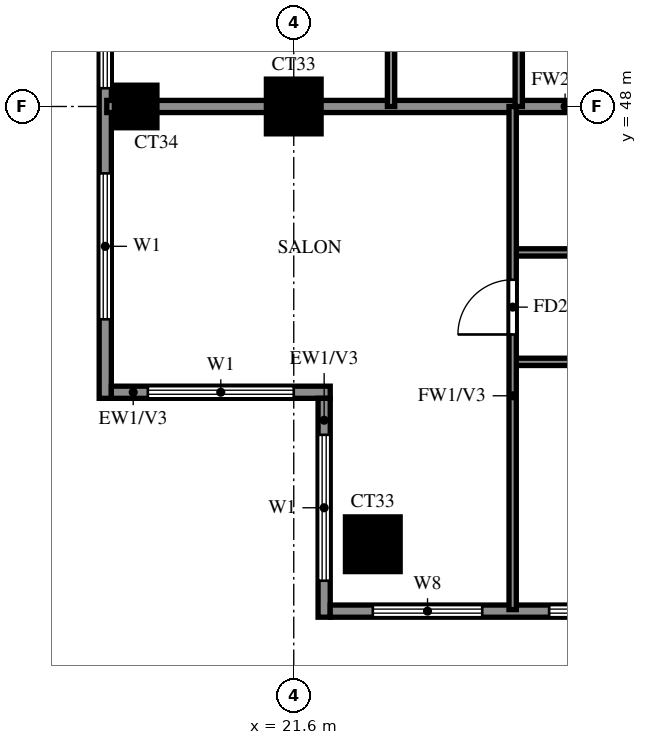
"""IFC4 building model, lengths in metres.
Left out: names, types, materials, properties, quantities, classifications, styles, units other than length and angle.
Written with IfcOpenShell. Run it as: python <this file> out.ifc"""

import sys

from ifc_helpers import new_model, si_unit, direction, frame, frame_2d, origin, origin_2d, place, context, subcontext, project, spatial, rectangle, extrude, source, transform, mapped, element, fill, save


model = new_model("IFC4")
c1 = context("Model", 3, precision=1e-05, world=origin(), true_north=direction((0.0, 1.0)))
c2 = subcontext(c1, "Body", "Model", "MODEL_VIEW")
j1 = project(units=[si_unit("LENGTHUNIT", "METRE"), si_unit("PLANEANGLEUNIT", "RADIAN")], contexts=[c1])
p1 = place(None, origin())
s1 = spatial("IfcSite", under=j1, at=p1, CompositionType="ELEMENT")
p2 = place(p1, origin())
s2 = spatial("IfcBuilding", under=s1, at=p2, CompositionType="ELEMENT")
p3 = place(p2, frame((0.0, 0.0, 222.0)))
s3 = spatial("IfcBuildingStorey", under=s2, at=p3, CompositionType="ELEMENT", Elevation=222.0)
m1 = source(origin(), c2, "Body", "SweptSolid", [
    extrude(rectangle(XDim=0.9, YDim=0.9, at=origin_2d()), origin(), (0.0, 0.0, 1.0), 3.22),
])
p4 = place(p3, frame((22.9, 40.8, 0.0), z_axis=(0.0, 0.0, 1.0), x_axis=(1.0, 0.0, 0.0)))
e1 = element("IfcColumn", 1, at=p4, inside=s3, PredefinedType="COLUMN", context=c2, shape_type="MappedRepresentation", body=[
    mapped(m1, transform((0.0, 0.0, 0.0))),
])
m2 = source(origin(), c2, "Body", "SweptSolid", [
    extrude(rectangle(XDim=0.7, YDim=0.7, at=origin_2d()), origin(), (0.0, 0.0, 1.0), 3.22),
])
p5 = place(p3, frame((19.0, 48.0, 0.0), z_axis=(0.0, 0.0, 1.0), x_axis=(1.0, 0.0, 0.0)))
e2 = element("IfcColumn", 2, at=p5, inside=s3, PredefinedType="COLUMN", context=c2, shape_type="MappedRepresentation", body=[
    mapped(m2, transform((0.0, 0.0, 0.0))),
])
p6 = place(p3, frame((21.6, 48.0, 0.0), z_axis=(0.0, 0.0, 1.0), x_axis=(1.0, 0.0, 0.0)))
e3 = element("IfcColumn", 3, at=p6, inside=s3, PredefinedType="COLUMN", context=c2, shape_type="MappedRepresentation", body=[
    mapped(m1, transform((0.0, 0.0, 0.0))),
])
p7 = place(p3, frame((18.5, 76.6, 0.0), z_axis=(0.0, 0.0, 1.0), x_axis=(0.0, -1.0, 0.0)))
e4 = element("IfcWall", 4, at=p7, inside=s3, PredefinedType="SOLIDWALL", context=c2, shape_type="SweptSolid", body=[
    extrude(rectangle(XDim=33.4, YDim=0.2, at=frame_2d((16.7, 0.0))), origin(), (0.0, 0.0, 1.0), 3.22),
])
p8 = place(p7, frame((7.9, 0.0, 0.0)))
e5 = element("IfcOpeningElement", 5, at=p8, cuts=e4, PredefinedType="OPENING", context=c2, shape_type="SweptSolid", body=[
    extrude(rectangle(XDim=1.8, YDim=2.4, at=frame_2d((0.9, 1.2))), frame((0.0, 0.11, 0.0), z_axis=(0.0, -1.0, 0.0), x_axis=(1.0, 0.0, 0.0)), (0.0, 0.0, 1.0), 0.22),
])
p9 = place(p7, frame((22.3, 0.0, 0.0)))
e6 = element("IfcOpeningElement", 6, at=p9, cuts=e4, PredefinedType="OPENING", context=c2, shape_type="SweptSolid", body=[
    extrude(rectangle(XDim=1.8, YDim=2.4, at=frame_2d((0.9, 1.2))), frame((0.0, 0.11, 0.0), z_axis=(0.0, -1.0, 0.0), x_axis=(1.0, 0.0, 0.0)), (0.0, 0.0, 1.0), 0.22),
])
p10 = place(p7, frame((29.7, 0.0, 0.6)))
e7 = element("IfcOpeningElement", 7, at=p10, cuts=e4, PredefinedType="OPENING", context=c2, shape_type="SweptSolid", body=[
    extrude(rectangle(XDim=2.4, YDim=2.4, at=frame_2d((1.2, 1.2))), frame((0.0, 0.11, 0.0), z_axis=(0.0, -1.0, 0.0), x_axis=(1.0, 0.0, 0.0)), (0.0, 0.0, 1.0), 0.22),
])
p11 = place(p7, frame((26.5, 0.0, 0.6)))
e8 = element("IfcOpeningElement", 8, at=p11, cuts=e4, PredefinedType="OPENING", context=c2, shape_type="SweptSolid", body=[
    extrude(rectangle(XDim=1.8, YDim=2.4, at=frame_2d((0.9, 1.2))), frame((0.0, 0.11, 0.0), z_axis=(0.0, -1.0, 0.0), x_axis=(1.0, 0.0, 0.0)), (0.0, 0.0, 1.0), 0.22),
])
p12 = place(p7, frame((15.4, 0.0, 0.6)))
e9 = element("IfcOpeningElement", 9, at=p12, cuts=e4, PredefinedType="OPENING", context=c2, shape_type="SweptSolid", body=[
    extrude(rectangle(XDim=2.4, YDim=2.4, at=frame_2d((1.2, 1.2))), frame((0.0, 0.11, 0.0), z_axis=(0.0, -1.0, 0.0), x_axis=(1.0, 0.0, 0.0)), (0.0, 0.0, 1.0), 0.22),
])
p13 = place(p7, frame((19.9, 0.0, 0.6)))
e10 = element("IfcOpeningElement", 10, at=p13, cuts=e4, PredefinedType="OPENING", context=c2, shape_type="SweptSolid", body=[
    extrude(rectangle(XDim=1.2, YDim=2.4, at=frame_2d((0.6, 1.2))), frame((0.0, 0.11, 0.0), z_axis=(0.0, -1.0, 0.0), x_axis=(1.0, 0.0, 0.0)), (0.0, 0.0, 1.0), 0.22),
])
p14 = place(p7, frame((12.1, 0.0, 0.6)))
e11 = element("IfcOpeningElement", 11, at=p14, cuts=e4, PredefinedType="OPENING", context=c2, shape_type="SweptSolid", body=[
    extrude(rectangle(XDim=1.8, YDim=2.4, at=frame_2d((0.9, 1.2))), frame((0.0, 0.11, 0.0), z_axis=(0.0, -1.0, 0.0), x_axis=(1.0, 0.0, 0.0)), (0.0, 0.0, 1.0), 0.22),
])
p15 = place(p7, frame((3.55, 0.0, 0.6)))
e12 = element("IfcOpeningElement", 12, at=p15, cuts=e4, PredefinedType="OPENING", context=c2, shape_type="SweptSolid", body=[
    extrude(rectangle(XDim=0.9, YDim=2.4, at=frame_2d((0.45, 1.2))), frame((0.0, 0.11, 0.0), z_axis=(0.0, -1.0, 0.0), x_axis=(1.0, 0.0, 0.0)), (0.0, 0.0, 1.0), 0.22),
])
p16 = place(p7, frame((5.5, 0.0, 0.6)))
e13 = element("IfcOpeningElement", 13, at=p16, cuts=e4, PredefinedType="OPENING", context=c2, shape_type="SweptSolid", body=[
    extrude(rectangle(XDim=1.2, YDim=2.4, at=frame_2d((0.6, 1.2))), frame((0.0, 0.11, 0.0), z_axis=(0.0, -1.0, 0.0), x_axis=(1.0, 0.0, 0.0)), (0.0, 0.0, 1.0), 0.22),
])
p17 = place(p7, frame((0.6, 0.0, 0.6)))
e14 = element("IfcOpeningElement", 14, at=p17, cuts=e4, PredefinedType="OPENING", context=c2, shape_type="SweptSolid", body=[
    extrude(rectangle(XDim=2.4, YDim=2.4, at=frame_2d((1.2, 1.2))), frame((0.0, 0.11, 0.0), z_axis=(0.0, -1.0, 0.0), x_axis=(1.0, 0.0, 0.0)), (0.0, 0.0, 1.0), 0.22),
])
p18 = place(p3, frame((18.6, 43.3, 0.0), z_axis=(0.0, 0.0, 1.0), x_axis=(1.0, 0.0, 0.0)))
e15 = element("IfcWall", 15, at=p18, inside=s3, PredefinedType="SOLIDWALL", context=c2, shape_type="SweptSolid", body=[
    extrude(rectangle(XDim=3.6, YDim=0.2, at=frame_2d((1.8, 0.0))), origin(), (0.0, 0.0, 1.0), 3.22),
])
p19 = place(p18, frame((0.6, 0.0, 0.6)))
e16 = element("IfcOpeningElement", 16, at=p19, cuts=e15, PredefinedType="OPENING", context=c2, shape_type="SweptSolid", body=[
    extrude(rectangle(XDim=2.4, YDim=2.4, at=frame_2d((1.2, 1.2))), frame((0.0, 0.11, 0.0), z_axis=(0.0, -1.0, 0.0), x_axis=(1.0, 0.0, 0.0)), (0.0, 0.0, 1.0), 0.22),
])
p20 = place(p3, frame((22.1, 43.2, 0.0), z_axis=(0.0, 0.0, 1.0), x_axis=(0.0, -1.0, 0.0)))
e17 = element("IfcWall", 17, at=p20, inside=s3, PredefinedType="SOLIDWALL", context=c2, shape_type="SweptSolid", body=[
    extrude(rectangle(XDim=3.6, YDim=0.2, at=frame_2d((1.8, 0.0))), origin(), (0.0, 0.0, 1.0), 3.22),
])
p21 = place(p20, frame((0.6, 0.0, 0.6)))
e18 = element("IfcOpeningElement", 18, at=p21, cuts=e17, PredefinedType="OPENING", context=c2, shape_type="SweptSolid", body=[
    extrude(rectangle(XDim=2.4, YDim=2.4, at=frame_2d((1.2, 1.2))), frame((0.0, 0.11, 0.0), z_axis=(0.0, -1.0, 0.0), x_axis=(1.0, 0.0, 0.0)), (0.0, 0.0, 1.0), 0.22),
])
p22 = place(p3, frame((22.2, 39.7, 0.0), z_axis=(0.0, 0.0, 1.0), x_axis=(1.0, 0.0, 0.0)))
e19 = element("IfcWall", 19, at=p22, inside=s3, PredefinedType="SOLIDWALL", context=c2, shape_type="SweptSolid", body=[
    extrude(rectangle(XDim=19.8, YDim=0.2, at=frame_2d((9.9, 0.0))), origin(), (0.0, 0.0, 1.0), 3.22),
])
p23 = place(p22, frame((9.3, 0.0, 0.0)))
e20 = element("IfcOpeningElement", 20, at=p23, cuts=e19, PredefinedType="OPENING", context=c2, shape_type="SweptSolid", body=[
    extrude(rectangle(XDim=1.8, YDim=2.4, at=frame_2d((0.9, 1.2))), frame((0.0, 0.11, 0.0), z_axis=(0.0, -1.0, 0.0), x_axis=(1.0, 0.0, 0.0)), (0.0, 0.0, 1.0), 0.22),
])
p24 = place(p22, frame((0.7, 0.0, 0.6)))
e21 = element("IfcOpeningElement", 21, at=p24, cuts=e19, PredefinedType="OPENING", context=c2, shape_type="SweptSolid", body=[
    extrude(rectangle(XDim=1.8, YDim=2.4, at=frame_2d((0.9, 1.2))), frame((0.0, 0.11, 0.0), z_axis=(0.0, -1.0, 0.0), x_axis=(1.0, 0.0, 0.0)), (0.0, 0.0, 1.0), 0.22),
])
p25 = place(p22, frame((3.6, 0.0, 0.6)))
e22 = element("IfcOpeningElement", 22, at=p25, cuts=e19, PredefinedType="OPENING", context=c2, shape_type="SweptSolid", body=[
    extrude(rectangle(XDim=2.4, YDim=2.4, at=frame_2d((1.2, 1.2))), frame((0.0, 0.11, 0.0), z_axis=(0.0, -1.0, 0.0), x_axis=(1.0, 0.0, 0.0)), (0.0, 0.0, 1.0), 0.22),
])
p26 = place(p22, frame((7.5, 0.0, 0.6)))
e23 = element("IfcOpeningElement", 23, at=p26, cuts=e19, PredefinedType="OPENING", context=c2, shape_type="SweptSolid", body=[
    extrude(rectangle(XDim=1.2, YDim=2.4, at=frame_2d((0.6, 1.2))), frame((0.0, 0.11, 0.0), z_axis=(0.0, -1.0, 0.0), x_axis=(1.0, 0.0, 0.0)), (0.0, 0.0, 1.0), 0.22),
])
p27 = place(p3, frame((18.525, 48.0, 0.0), z_axis=(0.0, 0.0, 1.0), x_axis=(1.0, 0.0, 0.0)))
e24 = element("IfcWall", 24, at=p27, inside=s3, PredefinedType="SOLIDWALL", context=c2, shape_type="SweptSolid", body=[
    extrude(rectangle(XDim=15.075, YDim=0.2, at=frame_2d((7.538, 0.0))), origin(), (0.0, 0.0, 1.0), 3.22),
])
p28 = place(p3, frame((25.2, 43.8, 0.0), z_axis=(0.0, 0.0, 1.0), x_axis=(1.0, 0.0, 0.0)))
e25 = element("IfcWall", 25, at=p28, inside=s3, PredefinedType="PARTITIONING", context=c2, shape_type="SweptSolid", body=[
    extrude(rectangle(XDim=8.4, YDim=0.12, at=frame_2d((4.2, 0.0))), origin(), (0.0, 0.0, 1.0), 3.22),
])
p29 = place(p28, frame((1.35, 0.0, 0.0)))
e26 = element("IfcOpeningElement", 26, at=p29, cuts=e25, PredefinedType="OPENING", context=c2, shape_type="SweptSolid", body=[
    extrude(rectangle(XDim=0.9, YDim=2.1, at=frame_2d((0.45, 1.05))), frame((0.0, 0.07, 0.0), z_axis=(0.0, -1.0, 0.0), x_axis=(1.0, 0.0, 0.0)), (0.0, 0.0, 1.0), 0.14),
])
p30 = place(p28, frame((5.55, 0.0, 0.0)))
e27 = element("IfcOpeningElement", 27, at=p30, cuts=e25, PredefinedType="OPENING", context=c2, shape_type="SweptSolid", body=[
    extrude(rectangle(XDim=0.9, YDim=2.1, at=frame_2d((0.45, 1.05))), frame((0.0, 0.07, 0.0), z_axis=(0.0, -1.0, 0.0), x_axis=(1.0, 0.0, 0.0)), (0.0, 0.0, 1.0), 0.14),
])
p31 = place(p3, frame((25.2, 45.6, 0.0), z_axis=(0.0, 0.0, 1.0), x_axis=(1.0, 0.0, 0.0)))
e28 = element("IfcWall", 28, at=p31, inside=s3, PredefinedType="PARTITIONING", context=c2, shape_type="SweptSolid", body=[
    extrude(rectangle(XDim=6.0, YDim=0.12, at=frame_2d((3.0, 0.0))), origin(), (0.0, 0.0, 1.0), 3.22),
])
p32 = place(p31, frame((1.425, 0.0, 0.0)))
e29 = element("IfcOpeningElement", 29, at=p32, cuts=e28, PredefinedType="OPENING", context=c2, shape_type="SweptSolid", body=[
    extrude(rectangle(XDim=0.9, YDim=2.1, at=frame_2d((0.45, 1.05))), frame((0.0, 0.07, 0.0), z_axis=(0.0, -1.0, 0.0), x_axis=(1.0, 0.0, 0.0)), (0.0, 0.0, 1.0), 0.14),
])
p33 = place(p3, frame((23.2, 48.0, 0.0), z_axis=(0.0, 0.0, 1.0), x_axis=(0.0, 1.0, 0.0)))
e30 = element("IfcWall", 30, at=p33, inside=s3, PredefinedType="PARTITIONING", context=c2, shape_type="SweptSolid", body=[
    extrude(rectangle(XDim=25.2, YDim=0.12, at=frame_2d((12.6, 0.0))), origin(), (0.0, 0.0, 1.0), 3.22),
])
p34 = place(p33, frame((1.35, 0.0, 0.0)))
e31 = element("IfcOpeningElement", 31, at=p34, cuts=e30, PredefinedType="OPENING", context=c2, shape_type="SweptSolid", body=[
    extrude(rectangle(XDim=0.9, YDim=2.1, at=frame_2d((0.45, 1.05))), frame((0.0, 0.07, 0.0), z_axis=(0.0, -1.0, 0.0), x_axis=(1.0, 0.0, 0.0)), (0.0, 0.0, 1.0), 0.14),
])
p35 = place(p33, frame((4.95, 0.0, 0.0)))
e32 = element("IfcOpeningElement", 32, at=p35, cuts=e30, PredefinedType="OPENING", context=c2, shape_type="SweptSolid", body=[
    extrude(rectangle(XDim=0.9, YDim=2.1, at=frame_2d((0.45, 1.05))), frame((0.0, 0.07, 0.0), z_axis=(0.0, -1.0, 0.0), x_axis=(1.0, 0.0, 0.0)), (0.0, 0.0, 1.0), 0.14),
])
p36 = place(p33, frame((10.05, 0.0, 0.0)))
e33 = element("IfcOpeningElement", 33, at=p36, cuts=e30, PredefinedType="OPENING", context=c2, shape_type="SweptSolid", body=[
    extrude(rectangle(XDim=1.5, YDim=2.1, at=frame_2d((0.75, 1.05))), frame((0.0, 0.07, 0.0), z_axis=(0.0, -1.0, 0.0), x_axis=(1.0, 0.0, 0.0)), (0.0, 0.0, 1.0), 0.14),
])
p37 = place(p33, frame((15.75, 0.0, 0.0)))
e34 = element("IfcOpeningElement", 34, at=p37, cuts=e30, PredefinedType="OPENING", context=c2, shape_type="SweptSolid", body=[
    extrude(rectangle(XDim=0.9, YDim=2.1, at=frame_2d((0.45, 1.05))), frame((0.0, 0.07, 0.0), z_axis=(0.0, -1.0, 0.0), x_axis=(1.0, 0.0, 0.0)), (0.0, 0.0, 1.0), 0.14),
])
p38 = place(p33, frame((19.35, 0.0, 0.0)))
e35 = element("IfcOpeningElement", 35, at=p38, cuts=e30, PredefinedType="OPENING", context=c2, shape_type="SweptSolid", body=[
    extrude(rectangle(XDim=0.9, YDim=2.1, at=frame_2d((0.45, 1.05))), frame((0.0, 0.07, 0.0), z_axis=(0.0, -1.0, 0.0), x_axis=(1.0, 0.0, 0.0)), (0.0, 0.0, 1.0), 0.14),
])
p39 = place(p33, frame((22.95, 0.0, 0.0)))
e36 = element("IfcOpeningElement", 36, at=p39, cuts=e30, PredefinedType="OPENING", context=c2, shape_type="SweptSolid", body=[
    extrude(rectangle(XDim=0.9, YDim=2.1, at=frame_2d((0.45, 1.05))), frame((0.0, 0.07, 0.0), z_axis=(0.0, -1.0, 0.0), x_axis=(1.0, 0.0, 0.0)), (0.0, 0.0, 1.0), 0.14),
])
p40 = place(p3, frame((25.2, 39.725, 0.0), z_axis=(0.0, 0.0, 1.0), x_axis=(0.0, 1.0, 0.0)))
e37 = element("IfcWall", 37, at=p40, inside=s3, PredefinedType="PARTITIONING", context=c2, shape_type="SweptSolid", body=[
    extrude(rectangle(XDim=8.275, YDim=0.12, at=frame_2d((4.137, 0.0))), origin(), (0.0, 0.0, 1.0), 3.22),
])
p41 = place(p40, frame((4.525, 0.0, 0.0)))
e38 = element("IfcOpeningElement", 38, at=p41, cuts=e37, PredefinedType="OPENING", context=c2, shape_type="SweptSolid", body=[
    extrude(rectangle(XDim=0.9, YDim=2.1, at=frame_2d((0.45, 1.05))), frame((0.0, 0.07, 0.0), z_axis=(0.0, -1.0, 0.0), x_axis=(1.0, 0.0, 0.0)), (0.0, 0.0, 1.0), 0.14),
])
p42 = place(p3, frame((25.3, 48.0, 0.0), z_axis=(0.0, 0.0, 1.0), x_axis=(0.0, 1.0, 0.0)))
e39 = element("IfcWall", 39, at=p42, inside=s3, PredefinedType="PARTITIONING", context=c2, shape_type="SweptSolid", body=[
    extrude(rectangle(XDim=7.2, YDim=0.12, at=frame_2d((3.6, 0.0))), origin(), (0.0, 0.0, 1.0), 3.22),
])
p43 = place(p42, frame((1.975, 0.0, 0.0)))
e40 = element("IfcOpeningElement", 40, at=p43, cuts=e39, PredefinedType="OPENING", context=c2, shape_type="SweptSolid", body=[
    extrude(rectangle(XDim=0.9, YDim=2.1, at=frame_2d((0.45, 1.05))), frame((0.0, 0.07, 0.0), z_axis=(0.0, -1.0, 0.0), x_axis=(1.0, 0.0, 0.0)), (0.0, 0.0, 1.0), 0.14),
])
p44 = place(p10, origin())
e41 = element("IfcWindow", 41, at=p44, inside=s3, PartitioningType="DOUBLE_PANEL_VERTICAL", PredefinedType="WINDOW", context=c2, shape_type="SweptSolid", body=[
    extrude(rectangle(XDim=2.4, YDim=2.4, at=frame_2d((1.2, 1.2))), frame((0.0, 0.03, 0.0), z_axis=(0.0, -1.0, 0.0), x_axis=(1.0, 0.0, 0.0)), (0.0, 0.0, 1.0), 0.06),
])
fill(e7, e41)
p45 = place(p11, origin())
e42 = element("IfcWindow", 42, at=p45, inside=s3, PartitioningType="DOUBLE_PANEL_VERTICAL", PredefinedType="WINDOW", context=c2, shape_type="SweptSolid", body=[
    extrude(rectangle(XDim=1.8, YDim=2.4, at=frame_2d((0.9, 1.2))), frame((0.0, 0.03, 0.0), z_axis=(0.0, -1.0, 0.0), x_axis=(1.0, 0.0, 0.0)), (0.0, 0.0, 1.0), 0.06),
])
fill(e8, e42)
p46 = place(p19, origin())
e43 = element("IfcWindow", 43, at=p46, inside=s3, PartitioningType="DOUBLE_PANEL_VERTICAL", PredefinedType="WINDOW", context=c2, shape_type="SweptSolid", body=[
    extrude(rectangle(XDim=2.4, YDim=2.4, at=frame_2d((1.2, 1.2))), frame((0.0, 0.03, 0.0), z_axis=(0.0, -1.0, 0.0), x_axis=(1.0, 0.0, 0.0)), (0.0, 0.0, 1.0), 0.06),
])
fill(e16, e43)
p47 = place(p21, origin())
e44 = element("IfcWindow", 44, at=p47, inside=s3, PartitioningType="DOUBLE_PANEL_VERTICAL", PredefinedType="WINDOW", context=c2, shape_type="SweptSolid", body=[
    extrude(rectangle(XDim=2.4, YDim=2.4, at=frame_2d((1.2, 1.2))), frame((0.0, 0.03, 0.0), z_axis=(0.0, -1.0, 0.0), x_axis=(1.0, 0.0, 0.0)), (0.0, 0.0, 1.0), 0.06),
])
fill(e18, e44)
p48 = place(p24, origin())
e45 = element("IfcWindow", 45, at=p48, inside=s3, PartitioningType="DOUBLE_PANEL_VERTICAL", PredefinedType="WINDOW", context=c2, shape_type="SweptSolid", body=[
    extrude(rectangle(XDim=1.8, YDim=2.4, at=frame_2d((0.9, 1.2))), frame((0.0, 0.03, 0.0), z_axis=(0.0, -1.0, 0.0), x_axis=(1.0, 0.0, 0.0)), (0.0, 0.0, 1.0), 0.06),
])
fill(e21, e45)
p49 = place(p25, origin())
e46 = element("IfcWindow", 46, at=p49, inside=s3, PartitioningType="DOUBLE_PANEL_VERTICAL", PredefinedType="WINDOW", context=c2, shape_type="SweptSolid", body=[
    extrude(rectangle(XDim=2.4, YDim=2.4, at=frame_2d((1.2, 1.2))), frame((0.0, 0.03, 0.0), z_axis=(0.0, -1.0, 0.0), x_axis=(1.0, 0.0, 0.0)), (0.0, 0.0, 1.0), 0.06),
])
fill(e22, e46)
p50 = place(p41, origin())
e47 = element("IfcDoor", 47, at=p50, inside=s3, OperationType="SINGLE_SWING_RIGHT", PredefinedType="DOOR", context=c2, shape_type="SweptSolid", body=[
    extrude(rectangle(XDim=0.9, YDim=2.1, at=frame_2d((0.45, 1.05))), frame((0.0, 0.025, 0.0), z_axis=(0.0, -1.0, 0.0), x_axis=(1.0, 0.0, 0.0)), (0.0, 0.0, 1.0), 0.05),
])
fill(e38, e47)
save(model, sys.argv[1])
